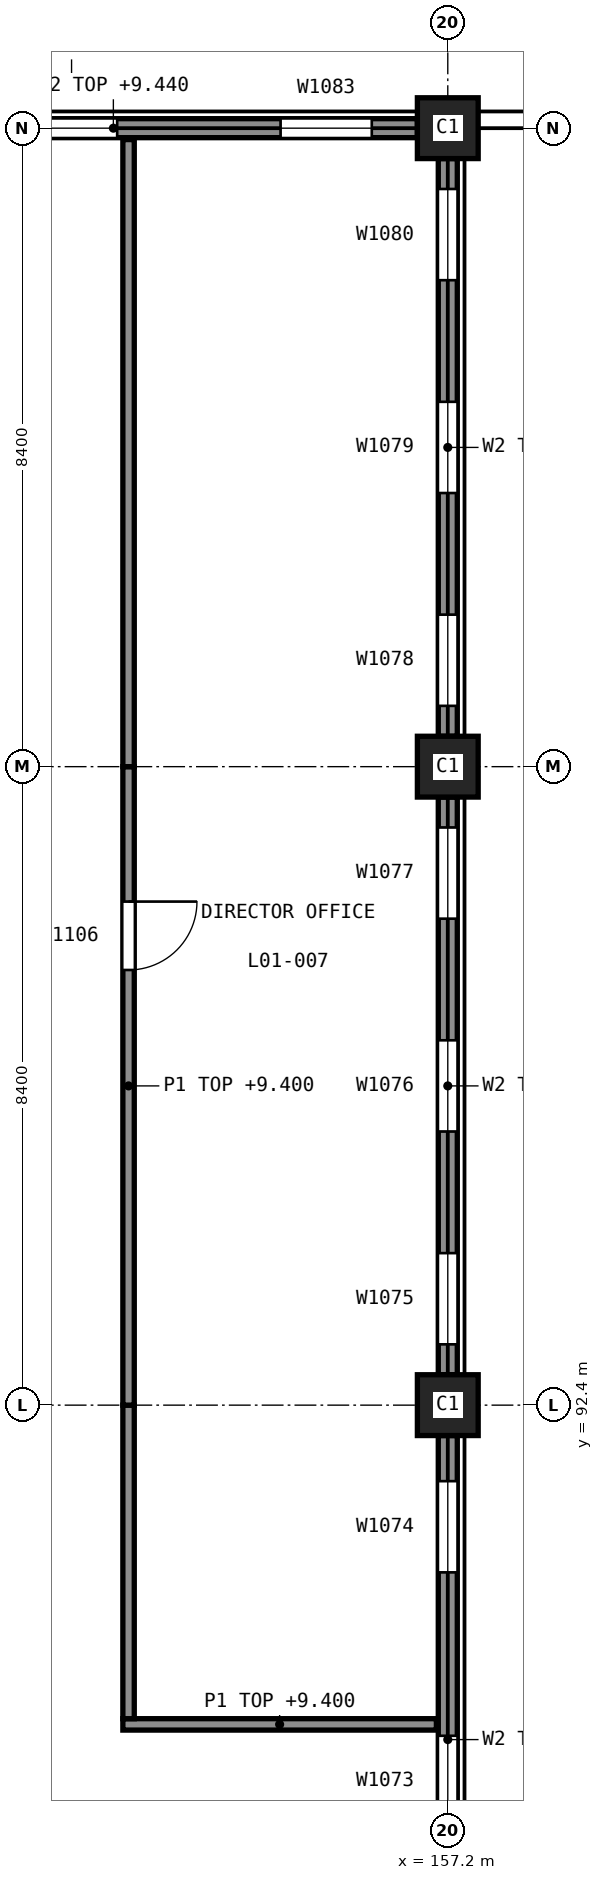
"""IFC4 building model, lengths in metres.
Left out: names, types, materials, properties, quantities, classifications, styles, units other than length and angle.
Written with IfcOpenShell. Run it as: python <this file> out.ifc"""

import sys

from ifc_helpers import new_model, si_unit, direction, frame, frame_2d, origin, origin_2d, place, context, subcontext, project, spatial, rectangle, extrude, element, fill, save


model = new_model("IFC4")
c1 = context("Model", 3, precision=1e-05, world=origin(), true_north=direction((0.0, 1.0)))
c2 = subcontext(c1, "Body", "Model", "MODEL_VIEW")
j1 = project(units=[si_unit("LENGTHUNIT", "METRE"), si_unit("PLANEANGLEUNIT", "RADIAN")], contexts=[c1])
p1 = place(None, origin())
s1 = spatial("IfcSite", under=j1, at=p1, CompositionType="ELEMENT")
p2 = place(p1, origin())
s2 = spatial("IfcBuilding", under=s1, at=p2, CompositionType="ELEMENT")
p3 = place(p2, frame((0.0, 0.0, 5.5)))
s3 = spatial("IfcBuildingStorey", under=s2, at=p3, CompositionType="ELEMENT", Elevation=5.5)
for number, where, z_axis, x_axis in (
    (1, (157.2, 92.4, 0.0), (0.0, 0.0, 1.0), (1.0, 0.0, 0.0)),
    (2, (157.2, 100.8, 0.0), (0.0, 0.0, 1.0), (1.0, 0.0, 0.0)),
    (3, (157.2, 109.2, 0.0), (0.0, 0.0, 1.0), (1.0, 0.0, 0.0)),
):
    element("IfcColumn", number, at=place(p3, frame(where, z_axis=z_axis, x_axis=x_axis)), inside=s3, PredefinedType="COLUMN", context=c2, shape_type="SweptSolid", body=[
        extrude(rectangle(XDim=0.8, YDim=0.8, at=origin_2d()), origin(), (0.0, 0.0, 1.0), 5.0),
    ])
p4 = place(p3, frame((157.2, 84.0, 0.0), z_axis=(0.0, 0.0, 1.0), x_axis=(0.0, 1.0, 0.0)))
e4 = element("IfcWall", 4, at=p4, inside=s3, PredefinedType="SOLIDWALL", context=c2, shape_type="SweptSolid", body=[
    extrude(rectangle(XDim=8.0, YDim=0.25, at=frame_2d((4.0, 0.0))), origin(), (0.0, 0.0, 1.0), 3.94),
])
p5 = place(p4, frame((0.6, 0.0, 0.9)))
e5 = element("IfcOpeningElement", 5, at=p5, cuts=e4, PredefinedType="OPENING", context=c2, shape_type="SweptSolid", body=[
    extrude(rectangle(XDim=1.2, YDim=2.1, at=frame_2d((0.6, 1.05))), frame((0.0, 0.135, 0.0), z_axis=(0.0, -1.0, 0.0), x_axis=(1.0, 0.0, 0.0)), (0.0, 0.0, 1.0), 0.27),
])
p6 = place(p4, frame((2.85, 0.0, 0.9)))
e6 = element("IfcOpeningElement", 6, at=p6, cuts=e4, PredefinedType="OPENING", context=c2, shape_type="SweptSolid", body=[
    extrude(rectangle(XDim=1.2, YDim=2.1, at=frame_2d((0.6, 1.05))), frame((0.0, 0.135, 0.0), z_axis=(0.0, -1.0, 0.0), x_axis=(1.0, 0.0, 0.0)), (0.0, 0.0, 1.0), 0.27),
])
p7 = place(p4, frame((6.2, 0.0, 0.9)))
e7 = element("IfcOpeningElement", 7, at=p7, cuts=e4, PredefinedType="OPENING", context=c2, shape_type="SweptSolid", body=[
    extrude(rectangle(XDim=1.2, YDim=2.1, at=frame_2d((0.6, 1.05))), frame((0.0, 0.135, 0.0), z_axis=(0.0, -1.0, 0.0), x_axis=(1.0, 0.0, 0.0)), (0.0, 0.0, 1.0), 0.27),
])
p8 = place(p3, frame((157.2, 92.8, 0.0), z_axis=(0.0, 0.0, 1.0), x_axis=(0.0, 1.0, 0.0)))
e8 = element("IfcWall", 8, at=p8, inside=s3, PredefinedType="SOLIDWALL", context=c2, shape_type="SweptSolid", body=[
    extrude(rectangle(XDim=7.6, YDim=0.25, at=frame_2d((3.8, 0.0))), origin(), (0.0, 0.0, 1.0), 3.94),
])
p9 = place(p8, frame((0.4, 0.0, 0.9)))
e9 = element("IfcOpeningElement", 9, at=p9, cuts=e8, PredefinedType="OPENING", context=c2, shape_type="SweptSolid", body=[
    extrude(rectangle(XDim=1.2, YDim=2.1, at=frame_2d((0.6, 1.05))), frame((0.0, 0.135, 0.0), z_axis=(0.0, -1.0, 0.0), x_axis=(1.0, 0.0, 0.0)), (0.0, 0.0, 1.0), 0.27),
])
p10 = place(p8, frame((3.2, 0.0, 0.9)))
e10 = element("IfcOpeningElement", 10, at=p10, cuts=e8, PredefinedType="OPENING", context=c2, shape_type="SweptSolid", body=[
    extrude(rectangle(XDim=1.2, YDim=2.1, at=frame_2d((0.6, 1.05))), frame((0.0, 0.135, 0.0), z_axis=(0.0, -1.0, 0.0), x_axis=(1.0, 0.0, 0.0)), (0.0, 0.0, 1.0), 0.27),
])
p11 = place(p8, frame((6.0, 0.0, 0.9)))
e11 = element("IfcOpeningElement", 11, at=p11, cuts=e8, PredefinedType="OPENING", context=c2, shape_type="SweptSolid", body=[
    extrude(rectangle(XDim=1.2, YDim=2.1, at=frame_2d((0.6, 1.05))), frame((0.0, 0.135, 0.0), z_axis=(0.0, -1.0, 0.0), x_axis=(1.0, 0.0, 0.0)), (0.0, 0.0, 1.0), 0.27),
])
p12 = place(p3, frame((157.2, 101.2, 0.0), z_axis=(0.0, 0.0, 1.0), x_axis=(0.0, 1.0, 0.0)))
e12 = element("IfcWall", 12, at=p12, inside=s3, PredefinedType="SOLIDWALL", context=c2, shape_type="SweptSolid", body=[
    extrude(rectangle(XDim=7.6, YDim=0.25, at=frame_2d((3.8, 0.0))), origin(), (0.0, 0.0, 1.0), 3.94),
])
p13 = place(p12, frame((0.4, 0.0, 0.9)))
e13 = element("IfcOpeningElement", 13, at=p13, cuts=e12, PredefinedType="OPENING", context=c2, shape_type="SweptSolid", body=[
    extrude(rectangle(XDim=1.2, YDim=2.1, at=frame_2d((0.6, 1.05))), frame((0.0, 0.135, 0.0), z_axis=(0.0, -1.0, 0.0), x_axis=(1.0, 0.0, 0.0)), (0.0, 0.0, 1.0), 0.27),
])
p14 = place(p12, frame((3.2, 0.0, 0.9)))
e14 = element("IfcOpeningElement", 14, at=p14, cuts=e12, PredefinedType="OPENING", context=c2, shape_type="SweptSolid", body=[
    extrude(rectangle(XDim=1.2, YDim=2.1, at=frame_2d((0.6, 1.05))), frame((0.0, 0.135, 0.0), z_axis=(0.0, -1.0, 0.0), x_axis=(1.0, 0.0, 0.0)), (0.0, 0.0, 1.0), 0.27),
])
p15 = place(p12, frame((6.0, 0.0, 0.9)))
e15 = element("IfcOpeningElement", 15, at=p15, cuts=e12, PredefinedType="OPENING", context=c2, shape_type="SweptSolid", body=[
    extrude(rectangle(XDim=1.2, YDim=2.1, at=frame_2d((0.6, 1.05))), frame((0.0, 0.135, 0.0), z_axis=(0.0, -1.0, 0.0), x_axis=(1.0, 0.0, 0.0)), (0.0, 0.0, 1.0), 0.27),
])
p16 = place(p3, frame((148.8, 109.2, 0.0), z_axis=(0.0, 0.0, 1.0), x_axis=(1.0, 0.0, 0.0)))
e16 = element("IfcWall", 16, at=p16, inside=s3, PredefinedType="SOLIDWALL", context=c2, shape_type="SweptSolid", body=[
    extrude(rectangle(XDim=8.0, YDim=0.25, at=frame_2d((4.0, 0.0))), origin(), (0.0, 0.0, 1.0), 3.94),
])
p17 = place(p16, frame((0.6, 0.0, 0.9)))
e17 = element("IfcOpeningElement", 17, at=p17, cuts=e16, PredefinedType="OPENING", context=c2, shape_type="SweptSolid", body=[
    extrude(rectangle(XDim=1.2, YDim=2.1, at=frame_2d((0.6, 1.05))), frame((0.0, 0.135, 0.0), z_axis=(0.0, -1.0, 0.0), x_axis=(1.0, 0.0, 0.0)), (0.0, 0.0, 1.0), 0.27),
])
p18 = place(p16, frame((2.85, 0.0, 0.9)))
e18 = element("IfcOpeningElement", 18, at=p18, cuts=e16, PredefinedType="OPENING", context=c2, shape_type="SweptSolid", body=[
    extrude(rectangle(XDim=1.2, YDim=2.1, at=frame_2d((0.6, 1.05))), frame((0.0, 0.135, 0.0), z_axis=(0.0, -1.0, 0.0), x_axis=(1.0, 0.0, 0.0)), (0.0, 0.0, 1.0), 0.27),
])
p19 = place(p16, frame((6.2, 0.0, 0.9)))
e19 = element("IfcOpeningElement", 19, at=p19, cuts=e16, PredefinedType="OPENING", context=c2, shape_type="SweptSolid", body=[
    extrude(rectangle(XDim=1.2, YDim=2.1, at=frame_2d((0.6, 1.05))), frame((0.0, 0.135, 0.0), z_axis=(0.0, -1.0, 0.0), x_axis=(1.0, 0.0, 0.0)), (0.0, 0.0, 1.0), 0.27),
])
for number, where, z_axis, x_axis in (
    (20, (152.925, 88.2, 0.0), (0.0, 0.0, 1.0), (1.0, 0.0, 0.0)),
    (21, (153.0, 88.275, 0.0), (0.0, 0.0, 1.0), (0.0, 1.0, 0.0)),
):
    element("IfcWall", number, at=place(p3, frame(where, z_axis=z_axis, x_axis=x_axis)), inside=s3, PredefinedType="PARTITIONING", context=c2, shape_type="SweptSolid", body=[
        extrude(rectangle(XDim=4.125, YDim=0.15, at=frame_2d((2.062, 0.0))), origin(), (0.0, 0.0, 1.0), 3.9),
    ])
p20 = place(p3, frame((153.0, 92.4, 0.0), z_axis=(0.0, 0.0, 1.0), x_axis=(0.0, 1.0, 0.0)))
e22 = element("IfcWall", 22, at=p20, inside=s3, PredefinedType="PARTITIONING", context=c2, shape_type="SweptSolid", body=[
    extrude(rectangle(XDim=8.4, YDim=0.15, at=frame_2d((4.2, 0.0))), origin(), (0.0, 0.0, 1.0), 3.9),
])
p21 = place(p20, frame((5.725, 0.0, 0.0)))
e23 = element("IfcOpeningElement", 23, at=p21, cuts=e22, PredefinedType="OPENING", context=c2, shape_type="SweptSolid", body=[
    extrude(rectangle(XDim=0.9, YDim=2.1, at=frame_2d((0.45, 1.05))), frame((0.0, 0.085, 0.0), z_axis=(0.0, -1.0, 0.0), x_axis=(1.0, 0.0, 0.0)), (0.0, 0.0, 1.0), 0.17),
])
p22 = place(p3, frame((153.0, 100.8, 0.0), z_axis=(0.0, 0.0, 1.0), x_axis=(0.0, 1.0, 0.0)))
e24 = element("IfcWall", 24, at=p22, inside=s3, PredefinedType="PARTITIONING", context=c2, shape_type="SweptSolid", body=[
    extrude(rectangle(XDim=8.25, YDim=0.15, at=frame_2d((4.125, 0.0))), origin(), (0.0, 0.0, 1.0), 3.9),
])
p23 = place(p6, origin())
e25 = element("IfcWindow", 25, at=p23, inside=s3, PartitioningType="SINGLE_PANEL", PredefinedType="WINDOW", context=c2, shape_type="SweptSolid", body=[
    extrude(rectangle(XDim=1.2, YDim=2.1, at=frame_2d((0.6, 1.05))), frame((0.0, 0.105, 0.0), z_axis=(0.0, -1.0, 0.0), x_axis=(1.0, 0.0, 0.0)), (0.0, 0.0, 1.0), 0.06),
])
fill(e6, e25)
p24 = place(p7, origin())
e26 = element("IfcWindow", 26, at=p24, inside=s3, PartitioningType="SINGLE_PANEL", PredefinedType="WINDOW", context=c2, shape_type="SweptSolid", body=[
    extrude(rectangle(XDim=1.2, YDim=2.1, at=frame_2d((0.6, 1.05))), frame((0.0, 0.105, 0.0), z_axis=(0.0, -1.0, 0.0), x_axis=(1.0, 0.0, 0.0)), (0.0, 0.0, 1.0), 0.06),
])
fill(e7, e26)
p25 = place(p9, origin())
e27 = element("IfcWindow", 27, at=p25, inside=s3, PartitioningType="SINGLE_PANEL", PredefinedType="WINDOW", context=c2, shape_type="SweptSolid", body=[
    extrude(rectangle(XDim=1.2, YDim=2.1, at=frame_2d((0.6, 1.05))), frame((0.0, 0.105, 0.0), z_axis=(0.0, -1.0, 0.0), x_axis=(1.0, 0.0, 0.0)), (0.0, 0.0, 1.0), 0.06),
])
fill(e9, e27)
p26 = place(p10, origin())
e28 = element("IfcWindow", 28, at=p26, inside=s3, PartitioningType="SINGLE_PANEL", PredefinedType="WINDOW", context=c2, shape_type="SweptSolid", body=[
    extrude(rectangle(XDim=1.2, YDim=2.1, at=frame_2d((0.6, 1.05))), frame((0.0, 0.105, 0.0), z_axis=(0.0, -1.0, 0.0), x_axis=(1.0, 0.0, 0.0)), (0.0, 0.0, 1.0), 0.06),
])
fill(e10, e28)
p27 = place(p11, origin())
e29 = element("IfcWindow", 29, at=p27, inside=s3, PartitioningType="SINGLE_PANEL", PredefinedType="WINDOW", context=c2, shape_type="SweptSolid", body=[
    extrude(rectangle(XDim=1.2, YDim=2.1, at=frame_2d((0.6, 1.05))), frame((0.0, 0.105, 0.0), z_axis=(0.0, -1.0, 0.0), x_axis=(1.0, 0.0, 0.0)), (0.0, 0.0, 1.0), 0.06),
])
fill(e11, e29)
p28 = place(p13, origin())
e30 = element("IfcWindow", 30, at=p28, inside=s3, PartitioningType="SINGLE_PANEL", PredefinedType="WINDOW", context=c2, shape_type="SweptSolid", body=[
    extrude(rectangle(XDim=1.2, YDim=2.1, at=frame_2d((0.6, 1.05))), frame((0.0, 0.105, 0.0), z_axis=(0.0, -1.0, 0.0), x_axis=(1.0, 0.0, 0.0)), (0.0, 0.0, 1.0), 0.06),
])
fill(e13, e30)
p29 = place(p14, origin())
e31 = element("IfcWindow", 31, at=p29, inside=s3, PartitioningType="SINGLE_PANEL", PredefinedType="WINDOW", context=c2, shape_type="SweptSolid", body=[
    extrude(rectangle(XDim=1.2, YDim=2.1, at=frame_2d((0.6, 1.05))), frame((0.0, 0.105, 0.0), z_axis=(0.0, -1.0, 0.0), x_axis=(1.0, 0.0, 0.0)), (0.0, 0.0, 1.0), 0.06),
])
fill(e14, e31)
p30 = place(p15, origin())
e32 = element("IfcWindow", 32, at=p30, inside=s3, PartitioningType="SINGLE_PANEL", PredefinedType="WINDOW", context=c2, shape_type="SweptSolid", body=[
    extrude(rectangle(XDim=1.2, YDim=2.1, at=frame_2d((0.6, 1.05))), frame((0.0, 0.105, 0.0), z_axis=(0.0, -1.0, 0.0), x_axis=(1.0, 0.0, 0.0)), (0.0, 0.0, 1.0), 0.06),
])
fill(e15, e32)
p31 = place(p18, origin())
e33 = element("IfcWindow", 33, at=p31, inside=s3, PartitioningType="SINGLE_PANEL", PredefinedType="WINDOW", context=c2, shape_type="SweptSolid", body=[
    extrude(rectangle(XDim=1.2, YDim=2.1, at=frame_2d((0.6, 1.05))), frame((0.0, -0.045, 0.0), z_axis=(0.0, -1.0, 0.0), x_axis=(1.0, 0.0, 0.0)), (0.0, 0.0, 1.0), 0.06),
])
fill(e18, e33)
p32 = place(p19, origin())
e34 = element("IfcWindow", 34, at=p32, inside=s3, PartitioningType="SINGLE_PANEL", PredefinedType="WINDOW", context=c2, shape_type="SweptSolid", body=[
    extrude(rectangle(XDim=1.2, YDim=2.1, at=frame_2d((0.6, 1.05))), frame((0.0, -0.045, 0.0), z_axis=(0.0, -1.0, 0.0), x_axis=(1.0, 0.0, 0.0)), (0.0, 0.0, 1.0), 0.06),
])
fill(e19, e34)
p33 = place(p21, origin())
e35 = element("IfcDoor", 35, at=p33, inside=s3, OperationType="SINGLE_SWING_RIGHT", PredefinedType="DOOR", context=c2, shape_type="SweptSolid", body=[
    extrude(rectangle(XDim=0.9, YDim=2.1, at=frame_2d((0.45, 1.05))), frame((0.0, 0.025, 0.0), z_axis=(0.0, -1.0, 0.0), x_axis=(1.0, 0.0, 0.0)), (0.0, 0.0, 1.0), 0.05),
])
fill(e23, e35)
save(model, sys.argv[1])
